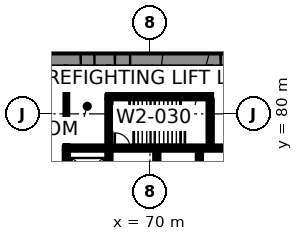
"""IFC4 building model, lengths in metres.
Left out: names, types, materials, properties, quantities, classifications, styles, units other than length and angle.
Written with IfcOpenShell. Run it as: python <this file> out.ifc"""

import sys

from ifc_helpers import new_model, si_unit, direction, frame, frame_2d, origin, place, context, subcontext, project, spatial, rectangle, extrude, element, fill, save


model = new_model("IFC4")
c1 = context("Model", 3, precision=1e-05, world=origin(), true_north=direction((0.0, 1.0)))
c2 = subcontext(c1, "Body", "Model", "MODEL_VIEW")
j1 = project(units=[si_unit("LENGTHUNIT", "METRE"), si_unit("PLANEANGLEUNIT", "RADIAN")], contexts=[c1])
p1 = place(None, origin())
s1 = spatial("IfcSite", under=j1, at=p1, CompositionType="ELEMENT")
p2 = place(p1, origin())
s2 = spatial("IfcBuilding", under=s1, at=p2, CompositionType="ELEMENT")
p3 = place(p2, origin())
s3 = spatial("IfcBuildingStorey", under=s2, at=p3, CompositionType="ELEMENT", Elevation=0.0)
p4 = place(p3, frame((62.0, 83.55, 0.0), z_axis=(0.0, 0.0, 1.0), x_axis=(1.0, 0.0, 0.0)))
e1 = element("IfcWall", 1, at=p4, inside=s3, PredefinedType="SHEAR", context=c2, shape_type="SweptSolid", body=[
    extrude(rectangle(XDim=26.0, YDim=0.9, at=frame_2d((13.0, 0.0))), origin(), (0.0, 0.0, 1.0), 7.7),
])
p5 = place(p4, frame((5.695, 0.0, 0.0)))
e2 = element("IfcOpeningElement", 2, at=p5, cuts=e1, PredefinedType="OPENING", context=c2, shape_type="SweptSolid", body=[
    extrude(rectangle(XDim=1.0, YDim=2.1, at=frame_2d((0.5, 1.05))), frame((0.0, 0.46, 0.0), z_axis=(0.0, -1.0, 0.0), x_axis=(1.0, 0.0, 0.0)), (0.0, 0.0, 1.0), 0.92),
])
p6 = place(p4, frame((19.505, 0.0, 0.0)))
e3 = element("IfcOpeningElement", 3, at=p6, cuts=e1, PredefinedType="OPENING", context=c2, shape_type="SweptSolid", body=[
    extrude(rectangle(XDim=1.0, YDim=2.1, at=frame_2d((0.5, 1.05))), frame((0.0, 0.46, 0.0), z_axis=(0.0, -1.0, 0.0), x_axis=(1.0, 0.0, 0.0)), (0.0, 0.0, 1.0), 0.92),
])
p7 = place(p4, frame((3.45, 0.0, 0.0)))
e4 = element("IfcOpeningElement", 4, at=p7, cuts=e1, PredefinedType="OPENING", context=c2, shape_type="SweptSolid", body=[
    extrude(rectangle(XDim=0.9, YDim=2.1, at=frame_2d((0.45, 1.05))), frame((0.0, 0.46, 0.0), z_axis=(0.0, -1.0, 0.0), x_axis=(1.0, 0.0, 0.0)), (0.0, 0.0, 1.0), 0.92),
])
p8 = place(p4, frame((12.65, 0.0, 0.0)))
e5 = element("IfcOpeningElement", 5, at=p8, cuts=e1, PredefinedType="OPENING", context=c2, shape_type="SweptSolid", body=[
    extrude(rectangle(XDim=0.9, YDim=2.1, at=frame_2d((0.45, 1.05))), frame((0.0, 0.46, 0.0), z_axis=(0.0, -1.0, 0.0), x_axis=(1.0, 0.0, 0.0)), (0.0, 0.0, 1.0), 0.92),
])
p9 = place(p4, frame((22.55, 0.0, 0.0)))
e6 = element("IfcOpeningElement", 6, at=p9, cuts=e1, PredefinedType="OPENING", context=c2, shape_type="SweptSolid", body=[
    extrude(rectangle(XDim=0.9, YDim=2.1, at=frame_2d((0.45, 1.05))), frame((0.0, 0.46, 0.0), z_axis=(0.0, -1.0, 0.0), x_axis=(1.0, 0.0, 0.0)), (0.0, 0.0, 1.0), 0.92),
])
for number, where, z_axis, x_axis in (
    (7, (64.5, 75.0, 0.0), (0.0, 0.0, 1.0), (0.0, 1.0, 0.0)),
    (8, (67.3, 75.0, 0.0), (0.0, 0.0, 1.0), (0.0, 1.0, 0.0)),
):
    element("IfcWall", number, at=place(p3, frame(where, z_axis=z_axis, x_axis=x_axis)), inside=s3, PredefinedType="SHEAR", context=c2, shape_type="SweptSolid", body=[
        extrude(rectangle(XDim=2.6, YDim=0.3, at=frame_2d((1.3, 0.0))), origin(), (0.0, 0.0, 1.0), 7.7),
    ])
p10 = place(p3, frame((70.45, 75.0, 0.0), z_axis=(0.0, 0.0, 1.0), x_axis=(0.0, 1.0, 0.0)))
e9 = element("IfcWall", 9, at=p10, inside=s3, PredefinedType="SHEAR", context=c2, shape_type="SweptSolid", body=[
    extrude(rectangle(XDim=2.6, YDim=0.3, at=frame_2d((1.3, 0.0))), origin(), (0.0, 0.0, 1.0), 7.7),
])
p11 = place(p10, frame((0.15, 0.0, 0.0)))
e10 = element("IfcOpeningElement", 10, at=p11, cuts=e9, PredefinedType="OPENING", context=c2, shape_type="SweptSolid", body=[
    extrude(rectangle(XDim=1.1, YDim=2.1, at=frame_2d((0.55, 1.05))), frame((0.0, 0.16, 0.0), z_axis=(0.0, -1.0, 0.0), x_axis=(1.0, 0.0, 0.0)), (0.0, 0.0, 1.0), 0.32),
])
p12 = place(p3, frame((73.25, 75.0, 0.0), z_axis=(0.0, 0.0, 1.0), x_axis=(0.0, 1.0, 0.0)))
e11 = element("IfcWall", 11, at=p12, inside=s3, PredefinedType="SHEAR", context=c2, shape_type="SweptSolid", body=[
    extrude(rectangle(XDim=2.6, YDim=0.3, at=frame_2d((1.3, 0.0))), origin(), (0.0, 0.0, 1.0), 7.7),
])
p13 = place(p3, frame((64.35, 77.75, 0.0), z_axis=(0.0, 0.0, 1.0), x_axis=(1.0, 0.0, 0.0)))
e12 = element("IfcWall", 12, at=p13, inside=s3, PredefinedType="SHEAR", context=c2, shape_type="SweptSolid", body=[
    extrude(rectangle(XDim=22.75, YDim=0.3, at=frame_2d((11.375, 0.0))), origin(), (0.0, 0.0, 1.0), 7.7),
])
p14 = place(p13, frame((3.345, 0.0, 0.0)))
e13 = element("IfcOpeningElement", 13, at=p14, cuts=e12, PredefinedType="OPENING", context=c2, shape_type="SweptSolid", body=[
    extrude(rectangle(XDim=1.0, YDim=2.1, at=frame_2d((0.5, 1.05))), frame((0.0, 0.16, 0.0), z_axis=(0.0, -1.0, 0.0), x_axis=(1.0, 0.0, 0.0)), (0.0, 0.0, 1.0), 0.32),
])
p15 = place(p3, frame((67.15, 81.13, 0.0), z_axis=(0.0, 0.0, 1.0), x_axis=(1.0, 0.0, 0.0)))
e14 = element("IfcWall", 14, at=p15, inside=s3, PredefinedType="SHEAR", context=c2, shape_type="SweptSolid", body=[
    extrude(rectangle(XDim=6.91, YDim=0.3, at=frame_2d((3.455, 0.0))), origin(), (0.0, 0.0, 1.0), 7.7),
])
p16 = place(p15, frame((0.545, 0.0, 0.0)))
e15 = element("IfcOpeningElement", 15, at=p16, cuts=e14, PredefinedType="OPENING", context=c2, shape_type="SweptSolid", body=[
    extrude(rectangle(XDim=1.0, YDim=2.1, at=frame_2d((0.5, 1.05))), frame((0.0, 0.16, 0.0), z_axis=(0.0, -1.0, 0.0), x_axis=(1.0, 0.0, 0.0)), (0.0, 0.0, 1.0), 0.32),
])
for number, where, z_axis, x_axis in (
    (16, (67.3, 77.9, 0.0), (0.0, 0.0, 1.0), (0.0, 1.0, 0.0)),
    (17, (73.96, 77.9, 0.0), (0.0, 0.0, 1.0), (0.0, 1.0, 0.0)),
):
    element("IfcWall", number, at=place(p3, frame(where, z_axis=z_axis, x_axis=x_axis)), inside=s3, PredefinedType="SHEAR", context=c2, shape_type="SweptSolid", body=[
        extrude(rectangle(XDim=3.08, YDim=0.3, at=frame_2d((1.54, 0.0))), origin(), (0.0, 0.0, 1.0), 7.7),
    ])
p17 = place(p3, frame((71.348, 110.424, 0.0), z_axis=(0.0, 0.0, 1.0), x_axis=(-0.500000550228, -0.86602508611, 0.0)))
e18 = element("IfcWall", 18, at=p17, inside=s3, PredefinedType="SOLIDWALL", context=c2, shape_type="SweptSolid", body=[
    extrude(rectangle(XDim=57.704, YDim=0.3, at=frame_2d((28.852, 0.0))), origin(), (0.0, 0.0, 1.0), 7.7),
])
p18 = place(p17, frame((16.711, 0.0, 0.0)))
e19 = element("IfcOpeningElement", 19, at=p18, cuts=e18, PredefinedType="OPENING", context=c2, shape_type="SweptSolid", body=[
    extrude(rectangle(XDim=1.2, YDim=2.4, at=frame_2d((0.6, 1.2))), frame((0.0, 0.16, 0.0), z_axis=(0.0, -1.0, 0.0), x_axis=(1.0, 0.0, 0.0)), (0.0, 0.0, 1.0), 0.32),
])
p19 = place(p17, frame((1.552, 0.0, 0.15)))
e20 = element("IfcOpeningElement", 20, at=p19, cuts=e18, PredefinedType="OPENING", context=c2, shape_type="SweptSolid", body=[
    extrude(rectangle(XDim=2.1, YDim=5.4, at=frame_2d((1.05, 2.7))), frame((0.0, 0.16, 0.0), z_axis=(0.0, -1.0, 0.0), x_axis=(1.0, 0.0, 0.0)), (0.0, 0.0, 1.0), 0.32),
])
p20 = place(p17, frame((4.052, 0.0, 0.15)))
e21 = element("IfcOpeningElement", 21, at=p20, cuts=e18, PredefinedType="OPENING", context=c2, shape_type="SweptSolid", body=[
    extrude(rectangle(XDim=2.1, YDim=5.4, at=frame_2d((1.05, 2.7))), frame((0.0, 0.16, 0.0), z_axis=(0.0, -1.0, 0.0), x_axis=(1.0, 0.0, 0.0)), (0.0, 0.0, 1.0), 0.32),
])
p21 = place(p17, frame((6.552, 0.0, 0.15)))
e22 = element("IfcOpeningElement", 22, at=p21, cuts=e18, PredefinedType="OPENING", context=c2, shape_type="SweptSolid", body=[
    extrude(rectangle(XDim=2.1, YDim=5.4, at=frame_2d((1.05, 2.7))), frame((0.0, 0.16, 0.0), z_axis=(0.0, -1.0, 0.0), x_axis=(1.0, 0.0, 0.0)), (0.0, 0.0, 1.0), 0.32),
])
p22 = place(p17, frame((9.052, 0.0, 0.15)))
e23 = element("IfcOpeningElement", 23, at=p22, cuts=e18, PredefinedType="OPENING", context=c2, shape_type="SweptSolid", body=[
    extrude(rectangle(XDim=2.1, YDim=5.4, at=frame_2d((1.05, 2.7))), frame((0.0, 0.16, 0.0), z_axis=(0.0, -1.0, 0.0), x_axis=(1.0, 0.0, 0.0)), (0.0, 0.0, 1.0), 0.32),
])
p23 = place(p17, frame((11.552, 0.0, 0.15)))
e24 = element("IfcOpeningElement", 24, at=p23, cuts=e18, PredefinedType="OPENING", context=c2, shape_type="SweptSolid", body=[
    extrude(rectangle(XDim=2.1, YDim=5.4, at=frame_2d((1.05, 2.7))), frame((0.0, 0.16, 0.0), z_axis=(0.0, -1.0, 0.0), x_axis=(1.0, 0.0, 0.0)), (0.0, 0.0, 1.0), 0.32),
])
p24 = place(p17, frame((14.052, 0.0, 0.15)))
e25 = element("IfcOpeningElement", 25, at=p24, cuts=e18, PredefinedType="OPENING", context=c2, shape_type="SweptSolid", body=[
    extrude(rectangle(XDim=2.1, YDim=5.4, at=frame_2d((1.05, 2.7))), frame((0.0, 0.16, 0.0), z_axis=(0.0, -1.0, 0.0), x_axis=(1.0, 0.0, 0.0)), (0.0, 0.0, 1.0), 0.32),
])
p25 = place(p17, frame((19.052, 0.0, 0.15)))
e26 = element("IfcOpeningElement", 26, at=p25, cuts=e18, PredefinedType="OPENING", context=c2, shape_type="SweptSolid", body=[
    extrude(rectangle(XDim=2.1, YDim=5.4, at=frame_2d((1.05, 2.7))), frame((0.0, 0.16, 0.0), z_axis=(0.0, -1.0, 0.0), x_axis=(1.0, 0.0, 0.0)), (0.0, 0.0, 1.0), 0.32),
])
p26 = place(p17, frame((21.552, 0.0, 0.15)))
e27 = element("IfcOpeningElement", 27, at=p26, cuts=e18, PredefinedType="OPENING", context=c2, shape_type="SweptSolid", body=[
    extrude(rectangle(XDim=2.1, YDim=5.4, at=frame_2d((1.05, 2.7))), frame((0.0, 0.16, 0.0), z_axis=(0.0, -1.0, 0.0), x_axis=(1.0, 0.0, 0.0)), (0.0, 0.0, 1.0), 0.32),
])
p27 = place(p17, frame((24.052, 0.0, 0.15)))
e28 = element("IfcOpeningElement", 28, at=p27, cuts=e18, PredefinedType="OPENING", context=c2, shape_type="SweptSolid", body=[
    extrude(rectangle(XDim=2.1, YDim=5.4, at=frame_2d((1.05, 2.7))), frame((0.0, 0.16, 0.0), z_axis=(0.0, -1.0, 0.0), x_axis=(1.0, 0.0, 0.0)), (0.0, 0.0, 1.0), 0.32),
])
p28 = place(p17, frame((26.552, 0.0, 0.15)))
e29 = element("IfcOpeningElement", 29, at=p28, cuts=e18, PredefinedType="OPENING", context=c2, shape_type="SweptSolid", body=[
    extrude(rectangle(XDim=2.1, YDim=5.4, at=frame_2d((1.05, 2.7))), frame((0.0, 0.16, 0.0), z_axis=(0.0, -1.0, 0.0), x_axis=(1.0, 0.0, 0.0)), (0.0, 0.0, 1.0), 0.32),
])
p29 = place(p17, frame((29.052, 0.0, 0.15)))
e30 = element("IfcOpeningElement", 30, at=p29, cuts=e18, PredefinedType="OPENING", context=c2, shape_type="SweptSolid", body=[
    extrude(rectangle(XDim=2.1, YDim=5.4, at=frame_2d((1.05, 2.7))), frame((0.0, 0.16, 0.0), z_axis=(0.0, -1.0, 0.0), x_axis=(1.0, 0.0, 0.0)), (0.0, 0.0, 1.0), 0.32),
])
p30 = place(p17, frame((31.552, 0.0, 0.15)))
e31 = element("IfcOpeningElement", 31, at=p30, cuts=e18, PredefinedType="OPENING", context=c2, shape_type="SweptSolid", body=[
    extrude(rectangle(XDim=2.1, YDim=5.4, at=frame_2d((1.05, 2.7))), frame((0.0, 0.16, 0.0), z_axis=(0.0, -1.0, 0.0), x_axis=(1.0, 0.0, 0.0)), (0.0, 0.0, 1.0), 0.32),
])
p31 = place(p17, frame((34.052, 0.0, 0.15)))
e32 = element("IfcOpeningElement", 32, at=p31, cuts=e18, PredefinedType="OPENING", context=c2, shape_type="SweptSolid", body=[
    extrude(rectangle(XDim=2.1, YDim=5.4, at=frame_2d((1.05, 2.7))), frame((0.0, 0.16, 0.0), z_axis=(0.0, -1.0, 0.0), x_axis=(1.0, 0.0, 0.0)), (0.0, 0.0, 1.0), 0.32),
])
p32 = place(p17, frame((36.552, 0.0, 0.15)))
e33 = element("IfcOpeningElement", 33, at=p32, cuts=e18, PredefinedType="OPENING", context=c2, shape_type="SweptSolid", body=[
    extrude(rectangle(XDim=2.1, YDim=5.4, at=frame_2d((1.05, 2.7))), frame((0.0, 0.16, 0.0), z_axis=(0.0, -1.0, 0.0), x_axis=(1.0, 0.0, 0.0)), (0.0, 0.0, 1.0), 0.32),
])
p33 = place(p17, frame((39.052, 0.0, 0.15)))
e34 = element("IfcOpeningElement", 34, at=p33, cuts=e18, PredefinedType="OPENING", context=c2, shape_type="SweptSolid", body=[
    extrude(rectangle(XDim=2.1, YDim=5.4, at=frame_2d((1.05, 2.7))), frame((0.0, 0.16, 0.0), z_axis=(0.0, -1.0, 0.0), x_axis=(1.0, 0.0, 0.0)), (0.0, 0.0, 1.0), 0.32),
])
p34 = place(p17, frame((41.552, 0.0, 0.15)))
e35 = element("IfcOpeningElement", 35, at=p34, cuts=e18, PredefinedType="OPENING", context=c2, shape_type="SweptSolid", body=[
    extrude(rectangle(XDim=2.1, YDim=5.4, at=frame_2d((1.05, 2.7))), frame((0.0, 0.16, 0.0), z_axis=(0.0, -1.0, 0.0), x_axis=(1.0, 0.0, 0.0)), (0.0, 0.0, 1.0), 0.32),
])
p35 = place(p17, frame((44.052, 0.0, 0.15)))
e36 = element("IfcOpeningElement", 36, at=p35, cuts=e18, PredefinedType="OPENING", context=c2, shape_type="SweptSolid", body=[
    extrude(rectangle(XDim=2.1, YDim=5.4, at=frame_2d((1.05, 2.7))), frame((0.0, 0.16, 0.0), z_axis=(0.0, -1.0, 0.0), x_axis=(1.0, 0.0, 0.0)), (0.0, 0.0, 1.0), 0.32),
])
p36 = place(p17, frame((46.552, 0.0, 0.15)))
e37 = element("IfcOpeningElement", 37, at=p36, cuts=e18, PredefinedType="OPENING", context=c2, shape_type="SweptSolid", body=[
    extrude(rectangle(XDim=2.1, YDim=5.4, at=frame_2d((1.05, 2.7))), frame((0.0, 0.16, 0.0), z_axis=(0.0, -1.0, 0.0), x_axis=(1.0, 0.0, 0.0)), (0.0, 0.0, 1.0), 0.32),
])
p37 = place(p17, frame((49.052, 0.0, 0.15)))
e38 = element("IfcOpeningElement", 38, at=p37, cuts=e18, PredefinedType="OPENING", context=c2, shape_type="SweptSolid", body=[
    extrude(rectangle(XDim=2.1, YDim=5.4, at=frame_2d((1.05, 2.7))), frame((0.0, 0.16, 0.0), z_axis=(0.0, -1.0, 0.0), x_axis=(1.0, 0.0, 0.0)), (0.0, 0.0, 1.0), 0.32),
])
p38 = place(p17, frame((51.552, 0.0, 0.15)))
e39 = element("IfcOpeningElement", 39, at=p38, cuts=e18, PredefinedType="OPENING", context=c2, shape_type="SweptSolid", body=[
    extrude(rectangle(XDim=2.1, YDim=5.4, at=frame_2d((1.05, 2.7))), frame((0.0, 0.16, 0.0), z_axis=(0.0, -1.0, 0.0), x_axis=(1.0, 0.0, 0.0)), (0.0, 0.0, 1.0), 0.32),
])
p39 = place(p17, frame((54.052, 0.0, 0.15)))
e40 = element("IfcOpeningElement", 40, at=p39, cuts=e18, PredefinedType="OPENING", context=c2, shape_type="SweptSolid", body=[
    extrude(rectangle(XDim=2.1, YDim=5.4, at=frame_2d((1.05, 2.7))), frame((0.0, 0.16, 0.0), z_axis=(0.0, -1.0, 0.0), x_axis=(1.0, 0.0, 0.0)), (0.0, 0.0, 1.0), 0.32),
])
p40 = place(p3, frame((64.5, 77.9, 0.0), z_axis=(0.0, 0.0, 1.0), x_axis=(0.0, 1.0, 0.0)))
e41 = element("IfcWall", 41, at=p40, inside=s3, PredefinedType="PARTITIONING", context=c2, shape_type="SweptSolid", body=[
    extrude(rectangle(XDim=5.2, YDim=0.2, at=frame_2d((2.6, 0.0))), origin(), (0.0, 0.0, 1.0), 7.7),
])
for number, where, z_axis, x_axis in (
    (42, (67.3, 81.28, 0.0), (0.0, 0.0, 1.0), (0.0, 1.0, 0.0)),
    (43, (73.96, 81.28, 0.0), (0.0, 0.0, 1.0), (0.0, 1.0, 0.0)),
):
    element("IfcWall", number, at=place(p3, frame(where, z_axis=z_axis, x_axis=x_axis)), inside=s3, PredefinedType="PARTITIONING", context=c2, shape_type="SweptSolid", body=[
        extrude(rectangle(XDim=1.82, YDim=0.2, at=frame_2d((0.91, 0.0))), origin(), (0.0, 0.0, 1.0), 7.7),
    ])
p41 = place(p14, origin())
e44 = element("IfcDoor", 44, at=p41, inside=s3, OperationType="SINGLE_SWING_LEFT", PredefinedType="DOOR", context=c2, shape_type="SweptSolid", body=[
    extrude(rectangle(XDim=1.0, YDim=2.1, at=frame_2d((0.5, 1.05))), frame((0.0, 0.025, 0.0), z_axis=(0.0, -1.0, 0.0), x_axis=(1.0, 0.0, 0.0)), (0.0, 0.0, 1.0), 0.05),
])
fill(e13, e44)
p42 = place(p16, origin())
e45 = element("IfcDoor", 45, at=p42, inside=s3, OperationType="SINGLE_SWING_RIGHT", PredefinedType="DOOR", context=c2, shape_type="SweptSolid", body=[
    extrude(rectangle(XDim=1.0, YDim=2.1, at=frame_2d((0.5, 1.05))), frame((0.0, 0.025, 0.0), z_axis=(0.0, -1.0, 0.0), x_axis=(1.0, 0.0, 0.0)), (0.0, 0.0, 1.0), 0.05),
])
fill(e15, e45)
p43 = place(p5, origin())
e46 = element("IfcDoor", 46, at=p43, inside=s3, OperationType="SINGLE_SWING_LEFT", PredefinedType="DOOR", context=c2, shape_type="SweptSolid", body=[
    extrude(rectangle(XDim=1.0, YDim=2.1, at=frame_2d((0.5, 1.05))), frame((0.0, 0.17, 0.0), z_axis=(0.0, -1.0, 0.0), x_axis=(1.0, 0.0, 0.0)), (0.0, 0.0, 1.0), 0.34),
])
fill(e2, e46)
p44 = place(p7, origin())
e47 = element("IfcDoor", 47, at=p44, inside=s3, OperationType="SINGLE_SWING_RIGHT", PredefinedType="DOOR", context=c2, shape_type="SweptSolid", body=[
    extrude(rectangle(XDim=0.9, YDim=2.1, at=frame_2d((0.45, 1.05))), frame((0.0, 0.17, 0.0), z_axis=(0.0, -1.0, 0.0), x_axis=(1.0, 0.0, 0.0)), (0.0, 0.0, 1.0), 0.34),
])
fill(e4, e47)
p45 = place(p8, origin())
e48 = element("IfcDoor", 48, at=p45, inside=s3, OperationType="SINGLE_SWING_LEFT", PredefinedType="DOOR", context=c2, shape_type="SweptSolid", body=[
    extrude(rectangle(XDim=0.9, YDim=2.1, at=frame_2d((0.45, 1.05))), frame((0.0, 0.17, 0.0), z_axis=(0.0, -1.0, 0.0), x_axis=(1.0, 0.0, 0.0)), (0.0, 0.0, 1.0), 0.34),
])
fill(e5, e48)
save(model, sys.argv[1])
